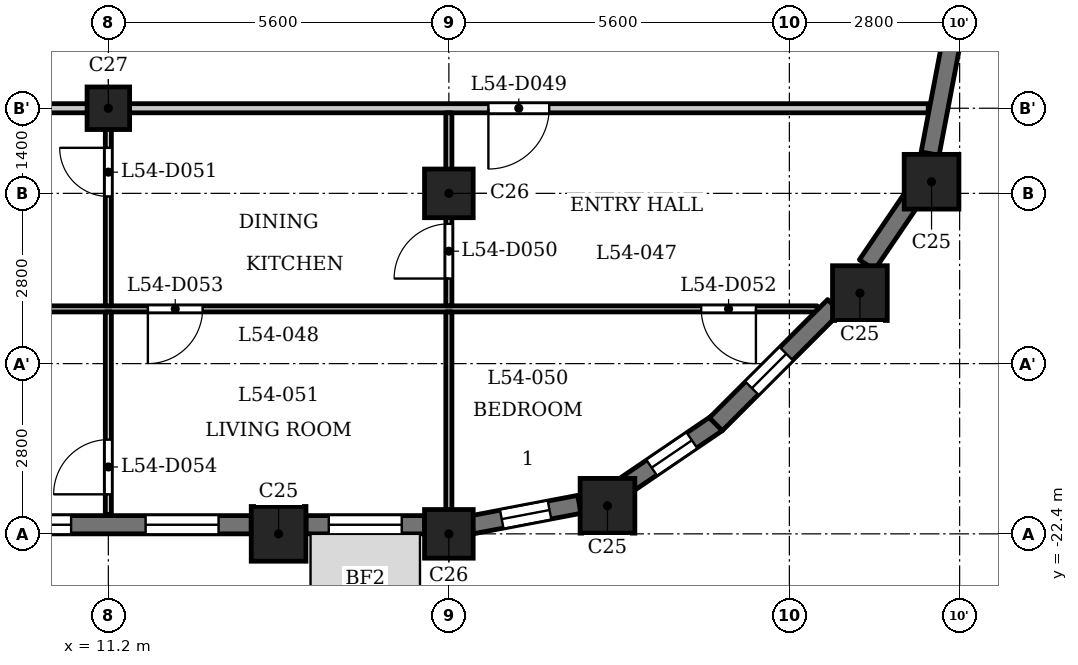
"""IFC4 building model, lengths in metres.
Left out: names, types, materials, properties, quantities, classifications, styles, units other than length and angle.
Written with IfcOpenShell. Run it as: python <this file> out.ifc"""

import sys

from ifc_helpers import new_model, si_unit, direction, frame, frame_2d, origin, origin_2d, place, context, subcontext, project, spatial, rectangle, extrude, element, fill, save


model = new_model("IFC4")
c1 = context("Model", 3, precision=1e-05, world=origin(), true_north=direction((0.0, 1.0)))
c2 = subcontext(c1, "Body", "Model", "MODEL_VIEW")
j1 = project(units=[si_unit("LENGTHUNIT", "METRE"), si_unit("PLANEANGLEUNIT", "RADIAN")], contexts=[c1])
p1 = place(None, origin())
s1 = spatial("IfcSite", under=j1, at=p1, CompositionType="ELEMENT")
p2 = place(p1, origin())
s2 = spatial("IfcBuilding", under=s1, at=p2, CompositionType="ELEMENT")
p3 = place(p2, frame((0.0, 0.0, 209.9)))
s3 = spatial("IfcBuildingStorey", under=s2, at=p3, CompositionType="ELEMENT", Elevation=209.9)
for number, where, z_axis, x_axis in (
    (1, (14.0, -22.4, 0.0), (0.0, 0.0, 1.0), (1.0, 0.0, 0.0)),
    (2, (19.409, -21.938, 0.0), (0.0, 0.0, 1.0), (1.0, 0.0, 0.0)),
    (3, (23.56, -18.44, 0.0), (0.0, 0.0, 1.0), (1.0, 0.0, 0.0)),
    (4, (24.738, -16.609, 0.0), (0.0, 0.0, 1.0), (1.0, 0.0, 0.0)),
):
    element("IfcColumn", number, at=place(p3, frame(where, z_axis=z_axis, x_axis=x_axis)), inside=s3, PredefinedType="COLUMN", context=c2, shape_type="SweptSolid", body=[
        extrude(rectangle(XDim=0.9, YDim=0.9, at=origin_2d()), origin(), (0.0, 0.0, 1.0), 3.5),
    ])
for number, where, z_axis, x_axis in (
    (5, (16.8, -22.4, 0.0), (0.0, 0.0, 1.0), (1.0, 0.0, 0.0)),
    (6, (16.8, -16.8, 0.0), (0.0, 0.0, 1.0), (1.0, 0.0, 0.0)),
):
    element("IfcColumn", number, at=place(p3, frame(where, z_axis=z_axis, x_axis=x_axis)), inside=s3, PredefinedType="COLUMN", context=c2, shape_type="SweptSolid", body=[
        extrude(rectangle(XDim=0.8, YDim=0.8, at=origin_2d()), origin(), (0.0, 0.0, 1.0), 3.5),
    ])
p4 = place(p3, frame((11.2, -15.4, 0.0), z_axis=(0.0, 0.0, 1.0), x_axis=(1.0, 0.0, 0.0)))
e7 = element("IfcColumn", 7, at=p4, inside=s3, PredefinedType="COLUMN", context=c2, shape_type="SweptSolid", body=[
    extrude(rectangle(XDim=0.7, YDim=0.7, at=origin_2d()), origin(), (0.0, 0.0, 1.0), 3.5),
])
p5 = place(p3, frame((8.85, -22.25, 0.0), z_axis=(0.0, 0.0, 1.0), x_axis=(1.0, 0.0, 0.0)))
e8 = element("IfcWall", 8, at=p5, inside=s3, PredefinedType="SOLIDWALL", context=c2, shape_type="SweptSolid", body=[
    extrude(rectangle(XDim=4.7, YDim=0.3, at=frame_2d((2.35, 0.0))), origin(), (0.0, 0.0, 1.0), 2.5),
])
p6 = place(p5, frame((0.538, 0.0, 0.6)))
e9 = element("IfcOpeningElement", 9, at=p6, cuts=e8, PredefinedType="OPENING", context=c2, shape_type="SweptSolid", body=[
    extrude(rectangle(XDim=1.2, YDim=1.55, at=frame_2d((0.6, 0.775))), frame((0.0, 0.16, 0.0), z_axis=(0.0, -1.0, 0.0), x_axis=(1.0, 0.0, 0.0)), (0.0, 0.0, 1.0), 0.32),
])
p7 = place(p5, frame((2.962, 0.0, 0.6)))
e10 = element("IfcOpeningElement", 10, at=p7, cuts=e8, PredefinedType="OPENING", context=c2, shape_type="SweptSolid", body=[
    extrude(rectangle(XDim=1.2, YDim=1.55, at=frame_2d((0.6, 0.775))), frame((0.0, 0.16, 0.0), z_axis=(0.0, -1.0, 0.0), x_axis=(1.0, 0.0, 0.0)), (0.0, 0.0, 1.0), 0.32),
])
p8 = place(p3, frame((14.45, -22.25, 0.0), z_axis=(0.0, 0.0, 1.0), x_axis=(1.0, 0.0, 0.0)))
e11 = element("IfcWall", 11, at=p8, inside=s3, PredefinedType="SOLIDWALL", context=c2, shape_type="SweptSolid", body=[
    extrude(rectangle(XDim=1.95, YDim=0.3, at=frame_2d((0.975, 0.0))), origin(), (0.0, 0.0, 1.0), 2.5),
])
p9 = place(p8, frame((0.375, 0.0, 0.6)))
e12 = element("IfcOpeningElement", 12, at=p9, cuts=e11, PredefinedType="OPENING", context=c2, shape_type="SweptSolid", body=[
    extrude(rectangle(XDim=1.2, YDim=1.55, at=frame_2d((0.6, 0.775))), frame((0.0, 0.16, 0.0), z_axis=(0.0, -1.0, 0.0), x_axis=(1.0, 0.0, 0.0)), (0.0, 0.0, 1.0), 0.32),
])
p10 = place(p3, frame((17.179, -22.251, 0.0), z_axis=(0.0, 0.0, 1.0), x_axis=(0.98230529033, 0.187286722942, 0.0)))
e13 = element("IfcWall", 13, at=p10, inside=s3, PredefinedType="SOLIDWALL", context=c2, shape_type="SweptSolid", body=[
    extrude(rectangle(XDim=1.799, YDim=0.3, at=frame_2d((0.899, 0.0))), origin(), (0.0, 0.0, 1.0), 2.5),
])
p11 = place(p10, frame((0.5, 0.0, 0.6)))
e14 = element("IfcOpeningElement", 14, at=p11, cuts=e13, PredefinedType="OPENING", context=c2, shape_type="SweptSolid", body=[
    extrude(rectangle(XDim=0.8, YDim=1.55, at=frame_2d((0.4, 0.775))), frame((0.0, 0.16, 0.0), z_axis=(0.0, -1.0, 0.0), x_axis=(1.0, 0.0, 0.0)), (0.0, 0.0, 1.0), 0.32),
])
p12 = place(p3, frame((19.719, -21.594, 0.0), z_axis=(0.0, 0.0, 1.0), x_axis=(0.827067282455, 0.562102935673, 0.0)))
e15 = element("IfcWall", 15, at=p12, inside=s3, PredefinedType="SOLIDWALL", context=c2, shape_type="SweptSolid", body=[
    extrude(rectangle(XDim=1.806, YDim=0.3, at=frame_2d((0.903, 0.0))), origin(), (0.0, 0.0, 1.0), 2.5),
])
p13 = place(p12, frame((0.503, 0.0, 0.6)))
e16 = element("IfcOpeningElement", 16, at=p13, cuts=e15, PredefinedType="OPENING", context=c2, shape_type="SweptSolid", body=[
    extrude(rectangle(XDim=0.8, YDim=1.55, at=frame_2d((0.4, 0.775))), frame((0.0, 0.16, 0.0), z_axis=(0.0, -1.0, 0.0), x_axis=(1.0, 0.0, 0.0)), (0.0, 0.0, 1.0), 0.32),
])
p14 = place(p3, frame((21.191, -20.597, 0.0), z_axis=(0.0, 0.0, 1.0), x_axis=(0.707106781187, 0.707106781187, 0.0)))
e17 = element("IfcWall", 17, at=p14, inside=s3, PredefinedType="SOLIDWALL", context=c2, shape_type="SweptSolid", body=[
    extrude(rectangle(XDim=2.75, YDim=0.3, at=frame_2d((1.375, 0.0))), origin(), (0.0, 0.0, 1.0), 2.5),
])
p15 = place(p14, frame((0.838, 0.0, 0.6)))
e18 = element("IfcOpeningElement", 18, at=p15, cuts=e17, PredefinedType="OPENING", context=c2, shape_type="SweptSolid", body=[
    extrude(rectangle(XDim=0.8, YDim=1.55, at=frame_2d((0.4, 0.775))), frame((0.0, 0.16, 0.0), z_axis=(0.0, -1.0, 0.0), x_axis=(1.0, 0.0, 0.0)), (0.0, 0.0, 1.0), 0.32),
])
p16 = place(p3, frame((23.676, -17.975, 0.0), z_axis=(0.0, 0.0, 1.0), x_axis=(0.56200149592, 0.827136215253, 0.0)))
e19 = element("IfcWall", 19, at=p16, inside=s3, PredefinedType="SOLIDWALL", context=c2, shape_type="SweptSolid", body=[
    extrude(rectangle(XDim=1.277, YDim=0.3, at=frame_2d((0.639, 0.0))), origin(), (0.0, 0.0, 1.0), 2.5),
])
p17 = place(p3, frame((24.714, -16.146, 0.0), z_axis=(0.0, 0.0, 1.0), x_axis=(0.187348135549, 0.982293579388, 0.0)))
e20 = element("IfcWall", 20, at=p17, inside=s3, PredefinedType="SOLIDWALL", context=c2, shape_type="SweptSolid", body=[
    extrude(rectangle(XDim=1.806, YDim=0.3, at=frame_2d((0.903, 0.0))), origin(), (0.0, 0.0, 1.0), 2.5),
])
p18 = place(p3, frame((-22.856, -18.7, 0.0), z_axis=(0.0, 0.0, 1.0), x_axis=(1.0, 0.0, 0.0)))
e21 = element("IfcWall", 21, at=p18, inside=s3, PredefinedType="PARTITIONING", context=c2, shape_type="SweptSolid", body=[
    extrude(rectangle(XDim=45.711, YDim=0.1, at=frame_2d((22.856, 0.0))), origin(), (0.0, 0.0, 1.0), 3.2),
])
p19 = place(p18, frame((4.084, 0.0, 0.0)))
e22 = element("IfcOpeningElement", 22, at=p19, cuts=e21, PredefinedType="OPENING", context=c2, shape_type="SweptSolid", body=[
    extrude(rectangle(XDim=0.9, YDim=2.1, at=frame_2d((0.45, 1.05))), frame((0.0, 0.06, 0.0), z_axis=(0.0, -1.0, 0.0), x_axis=(1.0, 0.0, 0.0)), (0.0, 0.0, 1.0), 0.12),
])
p20 = place(p18, frame((7.456, 0.0, 0.0)))
e23 = element("IfcOpeningElement", 23, at=p20, cuts=e21, PredefinedType="OPENING", context=c2, shape_type="SweptSolid", body=[
    extrude(rectangle(XDim=0.9, YDim=2.1, at=frame_2d((0.45, 1.05))), frame((0.0, 0.06, 0.0), z_axis=(0.0, -1.0, 0.0), x_axis=(1.0, 0.0, 0.0)), (0.0, 0.0, 1.0), 0.12),
])
p21 = place(p18, frame((23.506, 0.0, 0.0)))
e24 = element("IfcOpeningElement", 24, at=p21, cuts=e21, PredefinedType="OPENING", context=c2, shape_type="SweptSolid", body=[
    extrude(rectangle(XDim=0.8, YDim=2.1, at=frame_2d((0.4, 1.05))), frame((0.0, 0.06, 0.0), z_axis=(0.0, -1.0, 0.0), x_axis=(1.0, 0.0, 0.0)), (0.0, 0.0, 1.0), 0.12),
])
p22 = place(p18, frame((17.906, 0.0, 0.0)))
e25 = element("IfcOpeningElement", 25, at=p22, cuts=e21, PredefinedType="OPENING", context=c2, shape_type="SweptSolid", body=[
    extrude(rectangle(XDim=0.9, YDim=2.1, at=frame_2d((0.45, 1.05))), frame((0.0, 0.06, 0.0), z_axis=(0.0, -1.0, 0.0), x_axis=(1.0, 0.0, 0.0)), (0.0, 0.0, 1.0), 0.12),
])
p23 = place(p18, frame((43.806, 0.0, 0.0)))
e26 = element("IfcOpeningElement", 26, at=p23, cuts=e21, PredefinedType="OPENING", context=c2, shape_type="SweptSolid", body=[
    extrude(rectangle(XDim=0.9, YDim=2.1, at=frame_2d((0.45, 1.05))), frame((0.0, 0.06, 0.0), z_axis=(0.0, -1.0, 0.0), x_axis=(1.0, 0.0, 0.0)), (0.0, 0.0, 1.0), 0.12),
])
p24 = place(p18, frame((34.706, 0.0, 0.0)))
e27 = element("IfcOpeningElement", 27, at=p24, cuts=e21, PredefinedType="OPENING", context=c2, shape_type="SweptSolid", body=[
    extrude(rectangle(XDim=0.9, YDim=2.1, at=frame_2d((0.45, 1.05))), frame((0.0, 0.06, 0.0), z_axis=(0.0, -1.0, 0.0), x_axis=(1.0, 0.0, 0.0)), (0.0, 0.0, 1.0), 0.12),
])
p25 = place(p3, frame((-24.684, -15.4, 0.0), z_axis=(0.0, 0.0, 1.0), x_axis=(1.0, 0.0, 0.0)))
e28 = element("IfcWall", 28, at=p25, inside=s3, PredefinedType="PARTITIONING", context=c2, shape_type="SweptSolid", body=[
    extrude(rectangle(XDim=49.368, YDim=0.15, at=frame_2d((24.684, 0.0))), origin(), (0.0, 0.0, 1.0), 3.2),
])
p26 = place(p25, frame((1.143, 0.0, 0.0)))
e29 = element("IfcOpeningElement", 29, at=p26, cuts=e28, PredefinedType="OPENING", context=c2, shape_type="SweptSolid", body=[
    extrude(rectangle(XDim=1.0, YDim=2.1, at=frame_2d((0.5, 1.05))), frame((0.0, 0.085, 0.0), z_axis=(0.0, -1.0, 0.0), x_axis=(1.0, 0.0, 0.0)), (0.0, 0.0, 1.0), 0.17),
])
p27 = place(p25, frame((19.734, 0.0, 0.0)))
e30 = element("IfcOpeningElement", 30, at=p27, cuts=e28, PredefinedType="OPENING", context=c2, shape_type="SweptSolid", body=[
    extrude(rectangle(XDim=1.0, YDim=2.1, at=frame_2d((0.5, 1.05))), frame((0.0, 0.085, 0.0), z_axis=(0.0, -1.0, 0.0), x_axis=(1.0, 0.0, 0.0)), (0.0, 0.0, 1.0), 0.17),
])
p28 = place(p25, frame((42.134, 0.0, 0.0)))
e31 = element("IfcOpeningElement", 31, at=p28, cuts=e28, PredefinedType="OPENING", context=c2, shape_type="SweptSolid", body=[
    extrude(rectangle(XDim=1.0, YDim=2.1, at=frame_2d((0.5, 1.05))), frame((0.0, 0.085, 0.0), z_axis=(0.0, -1.0, 0.0), x_axis=(1.0, 0.0, 0.0)), (0.0, 0.0, 1.0), 0.17),
])
p29 = place(p3, frame((11.2, -22.08, 0.0), z_axis=(0.0, 0.0, 1.0), x_axis=(0.0, 1.0, 0.0)))
e32 = element("IfcWall", 32, at=p29, inside=s3, PredefinedType="PARTITIONING", context=c2, shape_type="SweptSolid", body=[
    extrude(rectangle(XDim=3.33, YDim=0.1, at=frame_2d((1.665, 0.0))), origin(), (0.0, 0.0, 1.0), 3.2),
])
p30 = place(p29, frame((0.33, 0.0, 0.0)))
e33 = element("IfcOpeningElement", 33, at=p30, cuts=e32, PredefinedType="OPENING", context=c2, shape_type="SweptSolid", body=[
    extrude(rectangle(XDim=0.9, YDim=2.1, at=frame_2d((0.45, 1.05))), frame((0.0, 0.06, 0.0), z_axis=(0.0, -1.0, 0.0), x_axis=(1.0, 0.0, 0.0)), (0.0, 0.0, 1.0), 0.12),
])
p31 = place(p3, frame((11.2, -18.65, 0.0), z_axis=(0.0, 0.0, 1.0), x_axis=(0.0, 1.0, 0.0)))
e34 = element("IfcWall", 34, at=p31, inside=s3, PredefinedType="PARTITIONING", context=c2, shape_type="SweptSolid", body=[
    extrude(rectangle(XDim=3.175, YDim=0.1, at=frame_2d((1.587, 0.0))), origin(), (0.0, 0.0, 1.0), 3.2),
])
p32 = place(p31, frame((1.799, 0.0, 0.0)))
e35 = element("IfcOpeningElement", 35, at=p32, cuts=e34, PredefinedType="OPENING", context=c2, shape_type="SweptSolid", body=[
    extrude(rectangle(XDim=0.8, YDim=2.1, at=frame_2d((0.4, 1.05))), frame((0.0, 0.06, 0.0), z_axis=(0.0, -1.0, 0.0), x_axis=(1.0, 0.0, 0.0)), (0.0, 0.0, 1.0), 0.12),
])
p33 = place(p3, frame((16.8, -22.31, 0.0), z_axis=(0.0, 0.0, 1.0), x_axis=(0.0, 1.0, 0.0)))
e36 = element("IfcWall", 36, at=p33, inside=s3, PredefinedType="PARTITIONING", context=c2, shape_type="SweptSolid", body=[
    extrude(rectangle(XDim=3.56, YDim=0.1, at=frame_2d((1.78, 0.0))), origin(), (0.0, 0.0, 1.0), 2.55),
])
p34 = place(p3, frame((16.8, -18.65, 0.0), z_axis=(0.0, 0.0, 1.0), x_axis=(0.0, 1.0, 0.0)))
e37 = element("IfcWall", 37, at=p34, inside=s3, PredefinedType="PARTITIONING", context=c2, shape_type="SweptSolid", body=[
    extrude(rectangle(XDim=3.175, YDim=0.1, at=frame_2d((1.587, 0.0))), origin(), (0.0, 0.0, 1.0), 2.55),
])
p35 = place(p34, frame((0.449, 0.0, 0.0)))
e38 = element("IfcOpeningElement", 38, at=p35, cuts=e37, PredefinedType="OPENING", context=c2, shape_type="SweptSolid", body=[
    extrude(rectangle(XDim=0.9, YDim=2.1, at=frame_2d((0.45, 1.05))), frame((0.0, 0.06, 0.0), z_axis=(0.0, -1.0, 0.0), x_axis=(1.0, 0.0, 0.0)), (0.0, 0.0, 1.0), 0.12),
])
p36 = place(p28, origin())
e39 = element("IfcDoor", 39, at=p36, inside=s3, OperationType="SINGLE_SWING_LEFT", PredefinedType="DOOR", context=c2, shape_type="SweptSolid", body=[
    extrude(rectangle(XDim=1.0, YDim=2.1, at=frame_2d((0.5, 1.05))), frame((0.0, 0.025, 0.0), z_axis=(0.0, -1.0, 0.0), x_axis=(1.0, 0.0, 0.0)), (0.0, 0.0, 1.0), 0.05),
])
fill(e31, e39)
p37 = place(p35, origin())
e40 = element("IfcDoor", 40, at=p37, inside=s3, OperationType="SINGLE_SWING_RIGHT", PredefinedType="DOOR", context=c2, shape_type="SweptSolid", body=[
    extrude(rectangle(XDim=0.9, YDim=2.1, at=frame_2d((0.45, 1.05))), frame((0.0, 0.025, 0.0), z_axis=(0.0, -1.0, 0.0), x_axis=(1.0, 0.0, 0.0)), (0.0, 0.0, 1.0), 0.05),
])
fill(e38, e40)
p38 = place(p32, origin())
e41 = element("IfcDoor", 41, at=p38, inside=s3, OperationType="SINGLE_SWING_LEFT", PredefinedType="DOOR", context=c2, shape_type="SweptSolid", body=[
    extrude(rectangle(XDim=0.8, YDim=2.1, at=frame_2d((0.4, 1.05))), frame((0.0, 0.025, 0.0), z_axis=(0.0, -1.0, 0.0), x_axis=(1.0, 0.0, 0.0)), (0.0, 0.0, 1.0), 0.05),
])
fill(e35, e41)
p39 = place(p23, origin())
e42 = element("IfcDoor", 42, at=p39, inside=s3, OperationType="SINGLE_SWING_RIGHT", PredefinedType="DOOR", context=c2, shape_type="SweptSolid", body=[
    extrude(rectangle(XDim=0.9, YDim=2.1, at=frame_2d((0.45, 1.05))), frame((0.0, 0.025, 0.0), z_axis=(0.0, -1.0, 0.0), x_axis=(1.0, 0.0, 0.0)), (0.0, 0.0, 1.0), 0.05),
])
fill(e26, e42)
p40 = place(p24, origin())
e43 = element("IfcDoor", 43, at=p40, inside=s3, OperationType="SINGLE_SWING_LEFT", PredefinedType="DOOR", context=c2, shape_type="SweptSolid", body=[
    extrude(rectangle(XDim=0.9, YDim=2.1, at=frame_2d((0.45, 1.05))), frame((0.0, 0.025, 0.0), z_axis=(0.0, -1.0, 0.0), x_axis=(1.0, 0.0, 0.0)), (0.0, 0.0, 1.0), 0.05),
])
fill(e27, e43)
p41 = place(p30, origin())
e44 = element("IfcDoor", 44, at=p41, inside=s3, OperationType="SINGLE_SWING_RIGHT", PredefinedType="DOOR", context=c2, shape_type="SweptSolid", body=[
    extrude(rectangle(XDim=0.9, YDim=2.1, at=frame_2d((0.45, 1.05))), frame((0.0, 0.025, 0.0), z_axis=(0.0, -1.0, 0.0), x_axis=(1.0, 0.0, 0.0)), (0.0, 0.0, 1.0), 0.05),
])
fill(e33, e44)
p42 = place(p6, origin())
e45 = element("IfcWindow", 45, at=p42, inside=s3, PartitioningType="SINGLE_PANEL", PredefinedType="WINDOW", context=c2, shape_type="SweptSolid", body=[
    extrude(rectangle(XDim=1.2, YDim=1.55, at=frame_2d((0.6, 0.775))), frame((0.0, 0.03, 0.0), z_axis=(0.0, -1.0, 0.0), x_axis=(1.0, 0.0, 0.0)), (0.0, 0.0, 1.0), 0.06),
])
fill(e9, e45)
p43 = place(p7, origin())
e46 = element("IfcWindow", 46, at=p43, inside=s3, PartitioningType="SINGLE_PANEL", PredefinedType="WINDOW", context=c2, shape_type="SweptSolid", body=[
    extrude(rectangle(XDim=1.2, YDim=1.55, at=frame_2d((0.6, 0.775))), frame((0.0, 0.03, 0.0), z_axis=(0.0, -1.0, 0.0), x_axis=(1.0, 0.0, 0.0)), (0.0, 0.0, 1.0), 0.06),
])
fill(e10, e46)
p44 = place(p9, origin())
e47 = element("IfcWindow", 47, at=p44, inside=s3, PartitioningType="SINGLE_PANEL", PredefinedType="WINDOW", context=c2, shape_type="SweptSolid", body=[
    extrude(rectangle(XDim=1.2, YDim=1.55, at=frame_2d((0.6, 0.775))), frame((0.0, 0.03, 0.0), z_axis=(0.0, -1.0, 0.0), x_axis=(1.0, 0.0, 0.0)), (0.0, 0.0, 1.0), 0.06),
])
fill(e12, e47)
p45 = place(p11, origin())
e48 = element("IfcWindow", 48, at=p45, inside=s3, PartitioningType="SINGLE_PANEL", PredefinedType="WINDOW", context=c2, shape_type="SweptSolid", body=[
    extrude(rectangle(XDim=0.8, YDim=1.55, at=frame_2d((0.4, 0.775))), frame((0.0, 0.03, 0.0), z_axis=(0.0, -1.0, 0.0), x_axis=(1.0, 0.0, 0.0)), (0.0, 0.0, 1.0), 0.06),
])
fill(e14, e48)
p46 = place(p13, origin())
e49 = element("IfcWindow", 49, at=p46, inside=s3, PartitioningType="SINGLE_PANEL", PredefinedType="WINDOW", context=c2, shape_type="SweptSolid", body=[
    extrude(rectangle(XDim=0.8, YDim=1.55, at=frame_2d((0.4, 0.775))), frame((0.0, 0.03, 0.0), z_axis=(0.0, -1.0, 0.0), x_axis=(1.0, 0.0, 0.0)), (0.0, 0.0, 1.0), 0.06),
])
fill(e16, e49)
p47 = place(p15, origin())
e50 = element("IfcWindow", 50, at=p47, inside=s3, PartitioningType="SINGLE_PANEL", PredefinedType="WINDOW", context=c2, shape_type="SweptSolid", body=[
    extrude(rectangle(XDim=0.8, YDim=1.55, at=frame_2d((0.4, 0.775))), frame((0.0, 0.03, 0.0), z_axis=(0.0, -1.0, 0.0), x_axis=(1.0, 0.0, 0.0)), (0.0, 0.0, 1.0), 0.06),
])
fill(e18, e50)
save(model, sys.argv[1])
